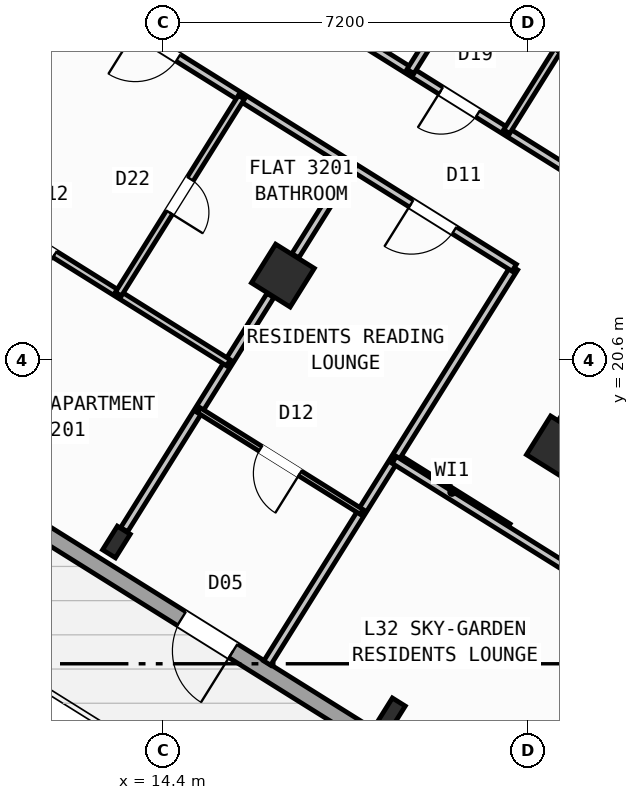
"""IFC4 building model, lengths in metres.
Left out: names, types, materials, properties, quantities, classifications, styles, units other than length and angle.
Written with IfcOpenShell. Run it as: python <this file> out.ifc"""

import sys

from ifc_helpers import new_model, si_unit, direction, frame, frame_2d, origin, origin_2d, place, context, subcontext, project, spatial, rectangle, hollow_rectangle, i_section, extrude, source, transform, mapped, element, fill, save


model = new_model("IFC4")
c1 = context("Model", 3, precision=1e-05, world=origin(), true_north=direction((0.0, 1.0)))
c2 = subcontext(c1, "Body", "Model", "MODEL_VIEW")
j1 = project(units=[si_unit("LENGTHUNIT", "METRE"), si_unit("PLANEANGLEUNIT", "RADIAN")], contexts=[c1])
p1 = place(None, origin())
s1 = spatial("IfcSite", under=j1, at=p1, CompositionType="ELEMENT")
p2 = place(p1, origin())
s2 = spatial("IfcBuilding", under=s1, at=p2, CompositionType="ELEMENT")
p3 = place(p2, frame((0.0, 0.0, 127.8)))
s3 = spatial("IfcBuildingStorey", under=s2, at=p3, CompositionType="ELEMENT", Elevation=127.8)
p4 = place(p3, frame((33.366, 12.477, 0.0), z_axis=(0.0, 0.0, 1.0), x_axis=(-0.848047359947, 0.529920442413, 0.0)))
e1 = element("IfcWall", 1, at=p4, inside=s3, PredefinedType="SHEAR", context=c2, shape_type="SweptSolid", body=[
    extrude(rectangle(XDim=13.14, YDim=0.55, at=frame_2d((6.57, 0.0))), origin(), (0.0, 0.0, 1.0), 4.55),
])
m1 = source(origin(), c2, "Body", "SweptSolid", [
    extrude(hollow_rectangle(XDim=0.9, YDim=0.9, WallThickness=0.036, at=origin_2d()), origin(), (0.0, 0.0, 1.0), 4.8),
])
p5 = place(p3, frame((22.191, 18.87, 0.0), z_axis=(0.0, 0.0, 1.0), x_axis=(-0.848048096156, 0.529919264233, 0.0)))
e2 = element("IfcColumn", 2, at=p5, inside=s3, PredefinedType="COLUMN", context=c2, shape_type="MappedRepresentation", body=[
    mapped(m1, transform((0.0, 0.0, 0.0), scale=1.0)),
])
m2 = source(origin(), c2, "Body", "SweptSolid", [
    extrude(i_section(OverallWidth=0.3, OverallDepth=0.55, WebThickness=0.015, FlangeThickness=0.029, at=origin_2d()), origin(), (0.0, 0.0, 1.0), 4.8),
])
p6 = place(p3, frame((18.906, 13.612, 0.0), z_axis=(0.0, 0.0, 1.0), x_axis=(-0.848048096156, 0.529919264233, 0.0)))
e3 = element("IfcColumn", 3, at=p6, inside=s3, PredefinedType="COLUMN", context=c2, shape_type="MappedRepresentation", body=[
    mapped(m2, transform((0.0, 0.0, 0.0), scale=1.0)),
])
p7 = place(p3, frame((16.764, 22.261, 0.0), z_axis=(0.0, 0.0, 1.0), x_axis=(-0.848048096156, 0.529919264233, 0.0)))
e4 = element("IfcColumn", 4, at=p7, inside=s3, PredefinedType="COLUMN", context=c2, shape_type="MappedRepresentation", body=[
    mapped(m1, transform((0.0, 0.0, 0.0), scale=1.0)),
])
p8 = place(p3, frame((13.478, 17.003, 0.0), z_axis=(0.0, 0.0, 1.0), x_axis=(-0.848048096156, 0.529919264233, 0.0)))
e5 = element("IfcColumn", 5, at=p8, inside=s3, PredefinedType="COLUMN", context=c2, shape_type="MappedRepresentation", body=[
    mapped(m2, transform((0.0, 0.0, 0.0), scale=1.0)),
])
p9 = place(p3, frame((29.268, 6.429, 0.0), z_axis=(0.0, 0.0, 1.0), x_axis=(-0.848049971435, 0.529916263149, 0.0)))
e6 = element("IfcWall", 6, at=p9, inside=s3, PredefinedType="STANDARD", context=c2, shape_type="SweptSolid", body=[
    extrude(rectangle(XDim=31.588, YDim=0.32, at=frame_2d((15.794, 0.0))), origin(), (0.0, 0.0, 1.0), 4.55),
])
p10 = place(p9, frame((15.901, 0.0, 0.0)))
e7 = element("IfcOpeningElement", 7, at=p10, cuts=e6, PredefinedType="OPENING", context=c2, shape_type="SweptSolid", body=[
    extrude(rectangle(XDim=1.2, YDim=2.15, at=frame_2d((0.6, 1.075))), frame((0.0, 0.17, 0.0), z_axis=(0.0, -1.0, 0.0), x_axis=(1.0, 0.0, 0.0)), (0.0, 0.0, 1.0), 0.34),
])
p11 = place(p9, frame((3.454, 0.0, 0.95)))
e8 = element("IfcOpeningElement", 8, at=p11, cuts=e6, PredefinedType="OPENING", context=c2, shape_type="SweptSolid", body=[
    extrude(rectangle(XDim=1.2, YDim=1.4, at=frame_2d((0.6, 0.7))), frame((0.0, 0.17, 0.0), z_axis=(0.0, -1.0, 0.0), x_axis=(1.0, 0.0, 0.0)), (0.0, 0.0, 1.0), 0.34),
])
p12 = place(p9, frame((7.561, 0.0, 0.85)))
e9 = element("IfcOpeningElement", 9, at=p12, cuts=e6, PredefinedType="OPENING", context=c2, shape_type="SweptSolid", body=[
    extrude(rectangle(XDim=1.8, YDim=1.5, at=frame_2d((0.9, 0.75))), frame((0.0, 0.17, 0.0), z_axis=(0.0, -1.0, 0.0), x_axis=(1.0, 0.0, 0.0)), (0.0, 0.0, 1.0), 0.34),
])
p13 = place(p9, frame((21.594, 0.0, 0.95)))
e10 = element("IfcOpeningElement", 10, at=p13, cuts=e6, PredefinedType="OPENING", context=c2, shape_type="SweptSolid", body=[
    extrude(rectangle(XDim=1.2, YDim=1.4, at=frame_2d((0.6, 0.7))), frame((0.0, 0.17, 0.0), z_axis=(0.0, -1.0, 0.0), x_axis=(1.0, 0.0, 0.0)), (0.0, 0.0, 1.0), 0.34),
])
p14 = place(p9, frame((29.878, 0.0, 1.0)))
e11 = element("IfcOpeningElement", 11, at=p14, cuts=e6, PredefinedType="OPENING", context=c2, shape_type="SweptSolid", body=[
    extrude(rectangle(XDim=0.9, YDim=1.25, at=frame_2d((0.45, 0.625))), frame((0.0, 0.17, 0.0), z_axis=(0.0, -1.0, 0.0), x_axis=(1.0, 0.0, 0.0)), (0.0, 0.0, 1.0), 0.34),
])
p15 = place(p9, frame((27.364, 0.0, 1.0)))
e12 = element("IfcOpeningElement", 12, at=p15, cuts=e6, PredefinedType="OPENING", context=c2, shape_type="SweptSolid", body=[
    extrude(rectangle(XDim=0.9, YDim=1.25, at=frame_2d((0.45, 0.625))), frame((0.0, 0.17, 0.0), z_axis=(0.0, -1.0, 0.0), x_axis=(1.0, 0.0, 0.0)), (0.0, 0.0, 1.0), 0.34),
])
p16 = place(p3, frame((2.415, 23.452, 0.0), z_axis=(0.0, 0.0, 1.0), x_axis=(0.52991049553, 0.848053575387, 0.0)))
e13 = element("IfcWall", 13, at=p16, inside=s3, PredefinedType="STANDARD", context=c2, shape_type="SweptSolid", body=[
    extrude(rectangle(XDim=21.587, YDim=0.32, at=frame_2d((10.794, 0.0))), origin(), (0.0, 0.0, 1.0), 3.975),
])
p17 = place(p16, frame((16.344, 0.0, 0.75)))
e14 = element("IfcOpeningElement", 14, at=p17, cuts=e13, PredefinedType="OPENING", context=c2, shape_type="SweptSolid", body=[
    extrude(rectangle(XDim=2.4, YDim=1.6, at=frame_2d((1.2, 0.8))), frame((0.0, 0.17, 0.0), z_axis=(0.0, -1.0, 0.0), x_axis=(1.0, 0.0, 0.0)), (0.0, 0.0, 1.0), 0.34),
])
p18 = place(p3, frame((14.138, 41.825, 0.0), z_axis=(0.0, 0.0, 1.0), x_axis=(0.848046498049, -0.529921821731, 0.0)))
e15 = element("IfcWall", 15, at=p18, inside=s3, PredefinedType="STANDARD", context=c2, shape_type="SweptSolid", body=[
    extrude(rectangle(XDim=31.588, YDim=0.32, at=frame_2d((15.794, 0.0))), origin(), (0.0, 0.0, 1.0), 4.55),
])
p19 = place(p18, frame((9.69, 0.0, 0.0)))
e16 = element("IfcOpeningElement", 16, at=p19, cuts=e15, PredefinedType="OPENING", context=c2, shape_type="SweptSolid", body=[
    extrude(rectangle(XDim=1.05, YDim=2.15, at=frame_2d((0.525, 1.075))), frame((0.0, 0.17, 0.0), z_axis=(0.0, -1.0, 0.0), x_axis=(1.0, 0.0, 0.0)), (0.0, 0.0, 1.0), 0.34),
])
p20 = place(p18, frame((14.666, 0.0, 0.0)))
e17 = element("IfcOpeningElement", 17, at=p20, cuts=e15, PredefinedType="OPENING", context=c2, shape_type="SweptSolid", body=[
    extrude(rectangle(XDim=1.5, YDim=2.25, at=frame_2d((0.75, 1.125))), frame((0.0, 0.17, 0.0), z_axis=(0.0, -1.0, 0.0), x_axis=(1.0, 0.0, 0.0)), (0.0, 0.0, 1.0), 0.34),
])
p21 = place(p18, frame((0.791, 0.0, 0.85)))
e18 = element("IfcOpeningElement", 18, at=p21, cuts=e15, PredefinedType="OPENING", context=c2, shape_type="SweptSolid", body=[
    extrude(rectangle(XDim=1.8, YDim=1.5, at=frame_2d((0.9, 0.75))), frame((0.0, 0.17, 0.0), z_axis=(0.0, -1.0, 0.0), x_axis=(1.0, 0.0, 0.0)), (0.0, 0.0, 1.0), 0.34),
])
p22 = place(p18, frame((3.996, 0.0, 0.95)))
e19 = element("IfcOpeningElement", 19, at=p22, cuts=e15, PredefinedType="OPENING", context=c2, shape_type="SweptSolid", body=[
    extrude(rectangle(XDim=1.2, YDim=1.4, at=frame_2d((0.6, 0.7))), frame((0.0, 0.17, 0.0), z_axis=(0.0, -1.0, 0.0), x_axis=(1.0, 0.0, 0.0)), (0.0, 0.0, 1.0), 0.34),
])
p23 = place(p18, frame((7.582, 0.0, 0.95)))
e20 = element("IfcOpeningElement", 20, at=p23, cuts=e15, PredefinedType="OPENING", context=c2, shape_type="SweptSolid", body=[
    extrude(rectangle(XDim=1.2, YDim=1.4, at=frame_2d((0.6, 0.7))), frame((0.0, 0.17, 0.0), z_axis=(0.0, -1.0, 0.0), x_axis=(1.0, 0.0, 0.0)), (0.0, 0.0, 1.0), 0.34),
])
p24 = place(p18, frame((21.381, 0.0, 0.75)))
e21 = element("IfcOpeningElement", 21, at=p24, cuts=e15, PredefinedType="OPENING", context=c2, shape_type="SweptSolid", body=[
    extrude(rectangle(XDim=2.4, YDim=1.6, at=frame_2d((1.2, 0.8))), frame((0.0, 0.17, 0.0), z_axis=(0.0, -1.0, 0.0), x_axis=(1.0, 0.0, 0.0)), (0.0, 0.0, 1.0), 0.34),
])
p25 = place(p18, frame((26.956, 0.0, 0.75)))
e22 = element("IfcOpeningElement", 22, at=p25, cuts=e15, PredefinedType="OPENING", context=c2, shape_type="SweptSolid", body=[
    extrude(rectangle(XDim=2.4, YDim=1.6, at=frame_2d((1.2, 0.8))), frame((0.0, 0.17, 0.0), z_axis=(0.0, -1.0, 0.0), x_axis=(1.0, 0.0, 0.0)), (0.0, 0.0, 1.0), 0.34),
])
p26 = place(p3, frame((21.206, 17.292, 0.0), z_axis=(0.0, 0.0, 1.0), x_axis=(-0.848050851465, 0.529914854792, 0.0)))
e23 = element("IfcWall", 23, at=p26, inside=s3, PredefinedType="PARTITIONING", context=c2, shape_type="SweptSolid", body=[
    extrude(rectangle(XDim=2.61, YDim=0.16, at=frame_2d((1.305, 0.0))), origin(), (0.0, 0.0, 1.0), 4.54),
])
p27 = place(p3, frame((21.329, 22.416, 0.0), z_axis=(0.0, 0.0, 1.0), x_axis=(-0.529920220799, -0.848047498427, 0.0)))
e24 = element("IfcWall", 24, at=p27, inside=s3, PredefinedType="PARTITIONING", context=c2, shape_type="SweptSolid", body=[
    extrude(rectangle(XDim=9.2, YDim=0.16, at=frame_2d((4.6, 0.0))), origin(), (0.0, 0.0, 1.0), 4.54),
])
p28 = place(p3, frame((22.495, 24.281, 0.0), z_axis=(0.0, 0.0, 1.0), x_axis=(-0.848052408131, 0.529912363569, 0.0)))
e25 = element("IfcWall", 25, at=p28, inside=s3, PredefinedType="PARTITIONING", context=c2, shape_type="SweptSolid", body=[
    extrude(rectangle(XDim=16.73, YDim=0.16, at=frame_2d((8.365, 0.0))), origin(), (0.0, 0.0, 1.0), 4.54),
])
p29 = place(p28, frame((2.22, 0.0, 0.0)))
e26 = element("IfcOpeningElement", 26, at=p29, cuts=e25, PredefinedType="OPENING", context=c2, shape_type="SweptSolid", body=[
    extrude(rectangle(XDim=0.86, YDim=2.05, at=frame_2d((0.43, 1.025))), frame((0.0, 0.09, 0.0), z_axis=(0.0, -1.0, 0.0), x_axis=(1.0, 0.0, 0.0)), (0.0, 0.0, 1.0), 0.18),
])
p30 = place(p28, frame((6.49, 0.0, 0.0)))
e27 = element("IfcOpeningElement", 27, at=p30, cuts=e25, PredefinedType="OPENING", context=c2, shape_type="SweptSolid", body=[
    extrude(rectangle(XDim=1.0, YDim=2.1, at=frame_2d((0.5, 1.05))), frame((0.0, 0.09, 0.0), z_axis=(0.0, -1.0, 0.0), x_axis=(1.0, 0.0, 0.0)), (0.0, 0.0, 1.0), 0.18),
])
p31 = place(p28, frame((11.14, 0.0, 0.0)))
e28 = element("IfcOpeningElement", 28, at=p31, cuts=e25, PredefinedType="OPENING", context=c2, shape_type="SweptSolid", body=[
    extrude(rectangle(XDim=1.0, YDim=2.1, at=frame_2d((0.5, 1.05))), frame((0.0, 0.09, 0.0), z_axis=(0.0, -1.0, 0.0), x_axis=(1.0, 0.0, 0.0)), (0.0, 0.0, 1.0), 0.18),
])
p32 = place(p3, frame((21.329, 22.416, 0.0), z_axis=(0.0, 0.0, 1.0), x_axis=(-0.848052408131, 0.529912363569, 0.0)))
e29 = element("IfcWall", 29, at=p32, inside=s3, PredefinedType="PARTITIONING", context=c2, shape_type="SweptSolid", body=[
    extrude(rectangle(XDim=16.73, YDim=0.16, at=frame_2d((8.365, 0.0))), origin(), (0.0, 0.0, 1.0), 4.54),
])
p33 = place(p32, frame((1.395, 0.0, 0.0)))
e30 = element("IfcOpeningElement", 30, at=p33, cuts=e29, PredefinedType="OPENING", context=c2, shape_type="SweptSolid", body=[
    extrude(rectangle(XDim=1.0, YDim=2.1, at=frame_2d((0.5, 1.05))), frame((0.0, 0.09, 0.0), z_axis=(0.0, -1.0, 0.0), x_axis=(1.0, 0.0, 0.0)), (0.0, 0.0, 1.0), 0.18),
])
p34 = place(p32, frame((7.82, 0.0, 0.0)))
e31 = element("IfcOpeningElement", 31, at=p34, cuts=e29, PredefinedType="OPENING", context=c2, shape_type="SweptSolid", body=[
    extrude(rectangle(XDim=1.0, YDim=2.1, at=frame_2d((0.5, 1.05))), frame((0.0, 0.09, 0.0), z_axis=(0.0, -1.0, 0.0), x_axis=(1.0, 0.0, 0.0)), (0.0, 0.0, 1.0), 0.18),
])
p35 = place(p32, frame((14.76, 0.0, 0.0)))
e32 = element("IfcOpeningElement", 32, at=p35, cuts=e29, PredefinedType="OPENING", context=c2, shape_type="SweptSolid", body=[
    extrude(rectangle(XDim=1.0, YDim=2.1, at=frame_2d((0.5, 1.05))), frame((0.0, 0.09, 0.0), z_axis=(0.0, -1.0, 0.0), x_axis=(1.0, 0.0, 0.0)), (0.0, 0.0, 1.0), 0.18),
])
p36 = place(p3, frame((18.115, 24.424, 0.0), z_axis=(0.0, 0.0, 1.0), x_axis=(-0.529904345651, -0.848057418139, 0.0)))
e33 = element("IfcWall", 33, at=p36, inside=s3, PredefinedType="PARTITIONING", context=c2, shape_type="SweptSolid", body=[
    extrude(rectangle(XDim=2.088, YDim=0.16, at=frame_2d((1.044, 0.0))), origin(), (0.0, 0.0, 1.0), 3.975),
])
p37 = place(p3, frame((16.519, 21.87, 0.0), z_axis=(0.0, 0.0, 1.0), x_axis=(-0.529922447305, -0.848046107144, 0.0)))
e34 = element("IfcWall", 34, at=p37, inside=s3, PredefinedType="PARTITIONING", context=c2, shape_type="SweptSolid", body=[
    extrude(rectangle(XDim=5.451, YDim=0.16, at=frame_2d((2.726, 0.0))), origin(), (0.0, 0.0, 1.0), 3.975),
])
p38 = place(p3, frame((18.318, 17.597, 0.0), z_axis=(0.0, 0.0, 1.0), x_axis=(-0.848059820872, 0.529900500304, 0.0)))
e35 = element("IfcWall", 35, at=p38, inside=s3, PredefinedType="PARTITIONING", context=c2, shape_type="SweptSolid", body=[
    extrude(rectangle(XDim=3.79, YDim=0.11, at=frame_2d((1.895, 0.0))), origin(), (0.0, 0.0, 1.0), 4.54),
])
p39 = place(p38, frame((1.435, 0.0, 0.0)))
e36 = element("IfcOpeningElement", 36, at=p39, cuts=e35, PredefinedType="OPENING", context=c2, shape_type="SweptSolid", body=[
    extrude(rectangle(XDim=0.92, YDim=2.08, at=frame_2d((0.46, 1.04))), frame((0.0, 0.065, 0.0), z_axis=(0.0, -1.0, 0.0), x_axis=(1.0, 0.0, 0.0)), (0.0, 0.0, 1.0), 0.13),
])
p40 = place(p3, frame((12.688, 27.815, 0.0), z_axis=(0.0, 0.0, 1.0), x_axis=(-0.529988430496, -0.848004872356, 0.0)))
e37 = element("IfcWall", 37, at=p40, inside=s3, PredefinedType="PARTITIONING", context=c2, shape_type="SweptSolid", body=[
    extrude(rectangle(XDim=2.088, YDim=0.16, at=frame_2d((1.044, 0.0))), origin(), (0.0, 0.0, 1.0), 3.975),
])
p41 = place(p3, frame((15.688, 20.54, 0.0), z_axis=(0.0, 0.0, 1.0), x_axis=(-0.848049732085, 0.529916646191, 0.0)))
e38 = element("IfcWall", 38, at=p41, inside=s3, PredefinedType="PLUMBINGWALL", context=c2, shape_type="SweptSolid", body=[
    extrude(rectangle(XDim=6.4, YDim=0.14, at=frame_2d((3.2, 0.0))), origin(), (0.0, 0.0, 1.0), 4.54),
])
p42 = place(p41, frame((4.04, 0.0, 0.0)))
e39 = element("IfcOpeningElement", 39, at=p42, cuts=e38, PredefinedType="OPENING", context=c2, shape_type="SweptSolid", body=[
    extrude(rectangle(XDim=0.92, YDim=2.08, at=frame_2d((0.46, 1.04))), frame((0.0, 0.08, 0.0), z_axis=(0.0, -1.0, 0.0), x_axis=(1.0, 0.0, 0.0)), (0.0, 0.0, 1.0), 0.16),
])
p43 = place(p3, frame((15.944, 25.781, 0.0), z_axis=(0.0, 0.0, 1.0), x_axis=(-0.529917480809, -0.848049210561, 0.0)))
e40 = element("IfcWall", 40, at=p43, inside=s3, PredefinedType="PLUMBINGWALL", context=c2, shape_type="SweptSolid", body=[
    extrude(rectangle(XDim=4.58, YDim=0.14, at=frame_2d((2.29, 0.0))), origin(), (0.0, 0.0, 1.0), 4.54),
])
p44 = place(p43, frame((1.9, 0.0, 0.0)))
e41 = element("IfcOpeningElement", 41, at=p44, cuts=e40, PredefinedType="OPENING", context=c2, shape_type="SweptSolid", body=[
    extrude(rectangle(XDim=0.78, YDim=2.05, at=frame_2d((0.39, 1.025))), frame((0.0, 0.08, 0.0), z_axis=(0.0, -1.0, 0.0), x_axis=(1.0, 0.0, 0.0)), (0.0, 0.0, 1.0), 0.16),
])
p45 = place(p3, frame((20.387, 28.06, 0.0), z_axis=(0.0, 0.0, 1.0), x_axis=(-0.529904345651, -0.848057418139, 0.0)))
e42 = element("IfcWall", 42, at=p45, inside=s3, PredefinedType="PARTITIONING", context=c2, shape_type="SweptSolid", body=[
    extrude(rectangle(XDim=2.088, YDim=0.16, at=frame_2d((1.044, 0.0))), origin(), (0.0, 0.0, 1.0), 3.975),
])
p46 = place(p3, frame((23.57, 28.927, 0.0), z_axis=(0.0, 0.0, 1.0), x_axis=(-0.529911350634, -0.84805304107, 0.0)))
e43 = element("IfcWall", 43, at=p46, inside=s3, PredefinedType="PLUMBINGWALL", context=c2, shape_type="SweptSolid", body=[
    extrude(rectangle(XDim=4.51, YDim=0.14, at=frame_2d((2.255, 0.0))), origin(), (0.0, 0.0, 1.0), 4.195),
])
p47 = place(p46, frame((1.865, 0.0, 0.0)))
e44 = element("IfcOpeningElement", 44, at=p47, cuts=e43, PredefinedType="OPENING", context=c2, shape_type="SweptSolid", body=[
    extrude(rectangle(XDim=0.78, YDim=2.05, at=frame_2d((0.39, 1.025))), frame((0.0, 0.08, 0.0), z_axis=(0.0, -1.0, 0.0), x_axis=(1.0, 0.0, 0.0)), (0.0, 0.0, 1.0), 0.16),
])
p48 = place(p3, frame((32.164, 10.374, 0.0), z_axis=(0.0, 0.0, 1.0), x_axis=(-0.848044107957, 0.529925646633, 0.0)))
e45 = element("IfcWall", 45, at=p48, inside=s3, PredefinedType="PARTITIONING", context=c2, shape_type="SweptSolid", body=[
    extrude(rectangle(XDim=15.57, YDim=0.16, at=frame_2d((7.785, 0.0))), origin(), (0.0, 0.0, 1.0), 4.54),
])
p49 = place(p48, frame((4.1, 0.0, 0.0)))
e46 = element("IfcOpeningElement", 46, at=p49, cuts=e45, PredefinedType="OPENING", context=c2, shape_type="SweptSolid", body=[
    extrude(rectangle(XDim=0.96, YDim=2.08, at=frame_2d((0.48, 1.04))), frame((0.0, 0.09, 0.0), z_axis=(0.0, -1.0, 0.0), x_axis=(1.0, 0.0, 0.0)), (0.0, 0.0, 1.0), 0.18),
])
p50 = place(p48, frame((8.2, 0.0, 0.0)))
e47 = element("IfcOpeningElement", 47, at=p50, cuts=e45, PredefinedType="OPENING", context=c2, shape_type="SweptSolid", body=[
    extrude(rectangle(XDim=1.7, YDim=2.2, at=frame_2d((0.85, 1.1))), frame((0.0, 0.09, 0.0), z_axis=(0.0, -1.0, 0.0), x_axis=(1.0, 0.0, 0.0)), (0.0, 0.0, 1.0), 0.18),
])
m3 = source(origin(), c2, "Body", "SweptSolid", [
    extrude(rectangle(XDim=1.2, YDim=2.15, at=frame_2d((0.6, 1.075))), frame((0.0, 0.025, 0.0), z_axis=(0.0, -1.0, 0.0), x_axis=(1.0, 0.0, 0.0)), (0.0, 0.0, 1.0), 0.05),
])
p51 = place(p10, origin())
e48 = element("IfcDoor", 48, at=p51, inside=s3, OperationType="SINGLE_SWING_LEFT", PredefinedType="DOOR", context=c2, shape_type="MappedRepresentation", body=[
    mapped(m3, transform((0.0, 0.0, 0.0), scale=1.0)),
])
fill(e7, e48)
m4 = source(origin(), c2, "Body", "SweptSolid", [
    extrude(rectangle(XDim=1.0, YDim=2.1, at=frame_2d((0.5, 1.05))), frame((0.0, 0.025, 0.0), z_axis=(0.0, -1.0, 0.0), x_axis=(1.0, 0.0, 0.0)), (0.0, 0.0, 1.0), 0.05),
])
p52 = place(p33, origin())
e49 = element("IfcDoor", 49, at=p52, inside=s3, OperationType="SINGLE_SWING_RIGHT", PredefinedType="DOOR", context=c2, shape_type="MappedRepresentation", body=[
    mapped(m4, transform((0.0, 0.0, 0.0), scale=1.0)),
])
fill(e30, e49)
m5 = source(origin(), c2, "Body", "SweptSolid", [
    extrude(rectangle(XDim=0.92, YDim=2.08, at=frame_2d((0.46, 1.04))), frame((0.0, 0.025, 0.0), z_axis=(0.0, -1.0, 0.0), x_axis=(1.0, 0.0, 0.0)), (0.0, 0.0, 1.0), 0.05),
])
p53 = place(p39, origin())
e50 = element("IfcDoor", 50, at=p53, inside=s3, OperationType="SINGLE_SWING_LEFT", PredefinedType="DOOR", context=c2, shape_type="MappedRepresentation", body=[
    mapped(m5, transform((0.0, 0.0, 0.0), scale=1.0)),
])
fill(e36, e50)
p54 = place(p34, origin())
e51 = element("IfcDoor", 51, at=p54, inside=s3, OperationType="SINGLE_SWING_RIGHT", PredefinedType="DOOR", context=c2, shape_type="MappedRepresentation", body=[
    mapped(m4, transform((0.0, 0.0, 0.0), scale=1.0)),
])
fill(e31, e51)
p55 = place(p42, origin())
e52 = element("IfcDoor", 52, at=p55, inside=s3, OperationType="SINGLE_SWING_LEFT", PredefinedType="DOOR", context=c2, shape_type="MappedRepresentation", body=[
    mapped(m5, transform((0.0, 0.0, 0.0), scale=1.0)),
])
fill(e39, e52)
m6 = source(origin(), c2, "Body", "SweptSolid", [
    extrude(rectangle(XDim=0.78, YDim=2.05, at=frame_2d((0.39, 1.025))), frame((0.0, 0.025, 0.0), z_axis=(0.0, -1.0, 0.0), x_axis=(1.0, 0.0, 0.0)), (0.0, 0.0, 1.0), 0.05),
])
p56 = place(p44, origin())
e53 = element("IfcDoor", 53, at=p56, inside=s3, OperationType="SINGLE_SWING_RIGHT", PredefinedType="DOOR", context=c2, shape_type="MappedRepresentation", body=[
    mapped(m6, transform((0.0, 0.0, 0.0), scale=1.0)),
])
fill(e41, e53)
m7 = source(origin(), c2, "Body", "SweptSolid", [
    extrude(rectangle(XDim=0.86, YDim=2.05, at=frame_2d((0.43, 1.025))), frame((0.0, 0.025, 0.0), z_axis=(0.0, -1.0, 0.0), x_axis=(1.0, 0.0, 0.0)), (0.0, 0.0, 1.0), 0.05),
])
p57 = place(p29, origin())
e54 = element("IfcDoor", 54, at=p57, inside=s3, OperationType="SINGLE_SWING_RIGHT", PredefinedType="DOOR", context=c2, shape_type="MappedRepresentation", body=[
    mapped(m7, transform((0.0, 0.0, 0.0), scale=1.0)),
])
fill(e26, e54)
p58 = place(p47, origin())
e55 = element("IfcDoor", 55, at=p58, inside=s3, OperationType="SINGLE_SWING_RIGHT", PredefinedType="DOOR", context=c2, shape_type="MappedRepresentation", body=[
    mapped(m6, transform((0.0, 0.0, 0.0), scale=1.0)),
])
fill(e44, e55)
save(model, sys.argv[1])
